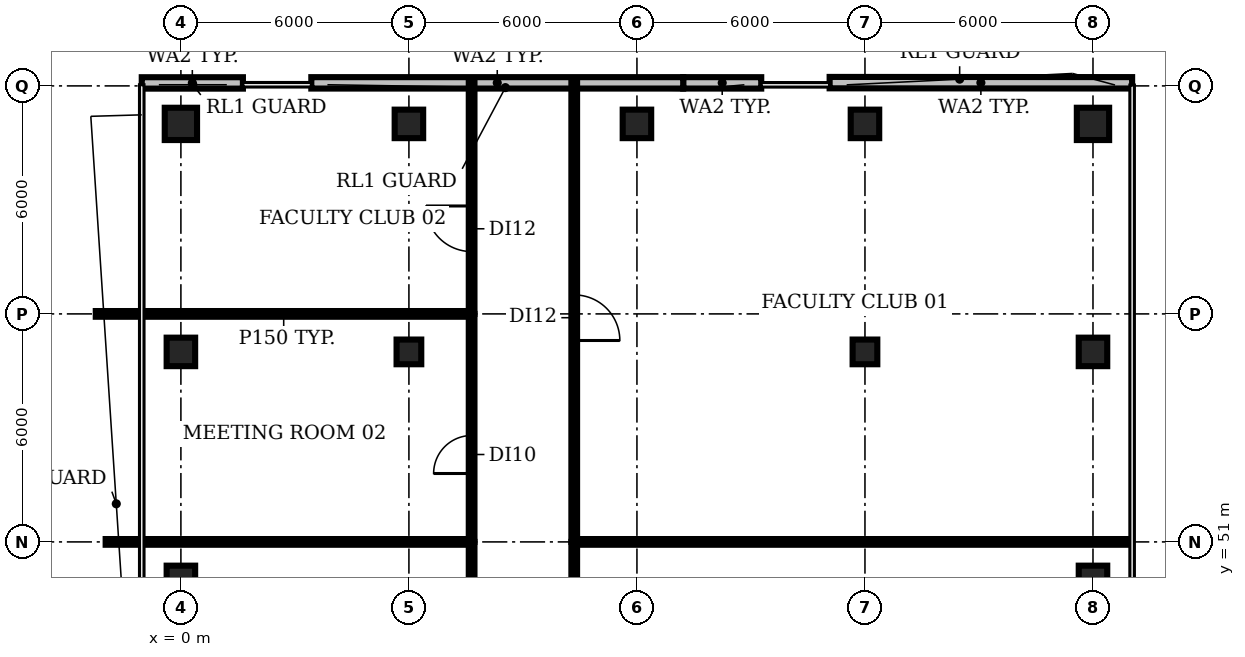
"""IFC4 building model, lengths in metres.
Left out: names, types, materials, properties, quantities, classifications, styles, units other than length and angle.
Written with IfcOpenShell. Run it as: python <this file> out.ifc"""

import sys

from ifc_helpers import new_model, si_unit, direction, frame, frame_2d, origin, origin_2d, place, context, subcontext, project, spatial, rectangle, circle, extrude, element, fill, save


model = new_model("IFC4")
c1 = context("Model", 3, precision=1e-05, world=origin(), true_north=direction((0.0, 1.0)))
c2 = subcontext(c1, "Body", "Model", "MODEL_VIEW")
j1 = project(units=[si_unit("LENGTHUNIT", "METRE"), si_unit("PLANEANGLEUNIT", "RADIAN")], contexts=[c1])
p1 = place(None, origin())
s1 = spatial("IfcSite", under=j1, at=p1, CompositionType="ELEMENT")
p2 = place(p1, origin())
s2 = spatial("IfcBuilding", under=s1, at=p2, CompositionType="ELEMENT")
p3 = place(p2, frame((0.0, 0.0, 297.8)))
s3 = spatial("IfcBuildingStorey", under=s2, at=p3, CompositionType="ELEMENT", Elevation=297.8)
for number, where, z_axis, x_axis in (
    (1, (0.0, 50.0, 0.0), (0.0, 0.0, 1.0), (1.0, 0.0, 0.0)),
    (2, (0.0, 56.0, 0.0), (0.0, 0.0, 1.0), (1.0, 0.0, 0.0)),
):
    element("IfcColumn", number, at=place(p3, frame(where, z_axis=z_axis, x_axis=x_axis)), inside=s3, PredefinedType="COLUMN", context=c2, shape_type="SweptSolid", body=[
        extrude(rectangle(XDim=0.75, YDim=0.75, at=origin_2d()), origin(), (0.0, 0.0, 1.0), 3.85),
    ])
p4 = place(p3, frame((0.0, 62.0, 0.0), z_axis=(0.0, 0.0, 1.0), x_axis=(1.0, 0.0, 0.0)))
e3 = element("IfcColumn", 3, at=p4, inside=s3, PredefinedType="COLUMN", context=c2, shape_type="SweptSolid", body=[
    extrude(circle(Radius=0.425, at=origin_2d()), origin(), (0.0, 0.0, 1.0), 3.85),
])
p5 = place(p3, frame((6.0, 56.0, 0.0), z_axis=(0.0, 0.0, 1.0), x_axis=(1.0, 0.0, 0.0)))
e4 = element("IfcColumn", 4, at=p5, inside=s3, PredefinedType="COLUMN", context=c2, shape_type="SweptSolid", body=[
    extrude(rectangle(XDim=0.65, YDim=0.65, at=origin_2d()), origin(), (0.0, 0.0, 1.0), 3.85),
])
for number, where, z_axis, x_axis in (
    (5, (6.0, 62.0, 0.0), (0.0, 0.0, 1.0), (1.0, 0.0, 0.0)),
    (6, (12.0, 62.0, 0.0), (0.0, 0.0, 1.0), (1.0, 0.0, 0.0)),
):
    element("IfcColumn", number, at=place(p3, frame(where, z_axis=z_axis, x_axis=x_axis)), inside=s3, PredefinedType="COLUMN", context=c2, shape_type="SweptSolid", body=[
        extrude(rectangle(XDim=0.75, YDim=0.75, at=origin_2d()), origin(), (0.0, 0.0, 1.0), 3.85),
    ])
p6 = place(p3, frame((18.0, 56.0, 0.0), z_axis=(0.0, 0.0, 1.0), x_axis=(1.0, 0.0, 0.0)))
e7 = element("IfcColumn", 7, at=p6, inside=s3, PredefinedType="COLUMN", context=c2, shape_type="SweptSolid", body=[
    extrude(rectangle(XDim=0.65, YDim=0.65, at=origin_2d()), origin(), (0.0, 0.0, 1.0), 3.85),
])
for number, where, z_axis, x_axis in (
    (8, (18.0, 62.0, 0.0), (0.0, 0.0, 1.0), (1.0, 0.0, 0.0)),
    (9, (24.0, 50.0, 0.0), (0.0, 0.0, 1.0), (1.0, 0.0, 0.0)),
    (10, (24.0, 56.0, 0.0), (0.0, 0.0, 1.0), (1.0, 0.0, 0.0)),
):
    element("IfcColumn", number, at=place(p3, frame(where, z_axis=z_axis, x_axis=x_axis)), inside=s3, PredefinedType="COLUMN", context=c2, shape_type="SweptSolid", body=[
        extrude(rectangle(XDim=0.75, YDim=0.75, at=origin_2d()), origin(), (0.0, 0.0, 1.0), 3.85),
    ])
p7 = place(p3, frame((24.0, 62.0, 0.0), z_axis=(0.0, 0.0, 1.0), x_axis=(1.0, 0.0, 0.0)))
e11 = element("IfcColumn", 11, at=p7, inside=s3, PredefinedType="COLUMN", context=c2, shape_type="SweptSolid", body=[
    extrude(circle(Radius=0.425, at=origin_2d()), origin(), (0.0, 0.0, 1.0), 3.85),
])
p8 = place(p3, frame((25.03, 63.081, 0.0), z_axis=(0.0, 0.0, 1.0), x_axis=(-0.99999979256, 0.000644112371, 0.0)))
e12 = element("IfcWall", 12, at=p8, inside=s3, PredefinedType="SOLIDWALL", context=c2, shape_type="SweptSolid", body=[
    extrude(rectangle(XDim=7.96, YDim=0.3, at=frame_2d((3.98, 0.0))), origin(), (0.0, 0.0, 1.0), 3.85),
])
p9 = place(p3, frame((15.271, 63.079, 0.0), z_axis=(0.0, 0.0, 1.0), x_axis=(-0.999999823309, 0.000594459531, 0.0)))
e13 = element("IfcWall", 13, at=p9, inside=s3, PredefinedType="SOLIDWALL", context=c2, shape_type="SweptSolid", body=[
    extrude(rectangle(XDim=2.053, YDim=0.3, at=frame_2d((1.027, 0.0))), origin(), (0.0, 0.0, 1.0), 3.85),
])
p10 = place(p3, frame((13.217, 63.08, 0.0), z_axis=(0.0, 0.0, 1.0), x_axis=(-1.0, 0.0, 0.0)))
e14 = element("IfcWall", 14, at=p10, inside=s3, PredefinedType="SOLIDWALL", context=c2, shape_type="SweptSolid", body=[
    extrude(rectangle(XDim=9.785, YDim=0.3, at=frame_2d((4.893, 0.0))), origin(), (0.0, 0.0, 1.0), 3.85),
])
p11 = place(p3, frame((1.632, 63.078, 0.0), z_axis=(0.0, 0.0, 1.0), x_axis=(-1.0, 0.0, 0.0)))
e15 = element("IfcWall", 15, at=p11, inside=s3, PredefinedType="SOLIDWALL", context=c2, shape_type="SweptSolid", body=[
    extrude(rectangle(XDim=2.662, YDim=0.3, at=frame_2d((1.331, 0.0))), origin(), (0.0, 0.0, 1.0), 3.85),
])
p12 = place(p3, frame((-2.24, 57.0, 0.0), z_axis=(0.0, 0.0, 1.0), x_axis=(1.0, 0.0, 0.0)))
e16 = element("IfcWall", 16, at=p12, inside=s3, PredefinedType="PARTITIONING", context=c2, shape_type="SweptSolid", body=[
    extrude(rectangle(XDim=9.89, YDim=0.15, at=frame_2d((4.945, 0.0))), origin(), (0.0, 0.0, 1.0), 2.9),
])
p13 = place(p3, frame((-1.98, 51.0, 0.0), z_axis=(0.0, 0.0, 1.0), x_axis=(1.0, 0.0, 0.0)))
e17 = element("IfcWall", 17, at=p13, inside=s3, PredefinedType="PARTITIONING", context=c2, shape_type="SweptSolid", body=[
    extrude(rectangle(XDim=9.63, YDim=0.15, at=frame_2d((4.815, 0.0))), origin(), (0.0, 0.0, 1.0), 2.9),
])
p14 = place(p3, frame((7.65, 39.0, 0.0), z_axis=(0.0, 0.0, 1.0), x_axis=(0.0, 1.0, 0.0)))
e18 = element("IfcWall", 18, at=p14, inside=s3, PredefinedType="PARTITIONING", context=c2, shape_type="SweptSolid", body=[
    extrude(rectangle(XDim=12.0, YDim=0.15, at=frame_2d((6.0, 0.0))), origin(), (0.0, 0.0, 1.0), 2.9),
])
p15 = place(p14, frame((7.0, 0.0, 0.0)))
e19 = element("IfcOpeningElement", 19, at=p15, cuts=e18, PredefinedType="OPENING", context=c2, shape_type="SweptSolid", body=[
    extrude(rectangle(XDim=1.2, YDim=2.1, at=frame_2d((0.6, 1.05))), frame((0.0, 0.085, 0.0), z_axis=(0.0, -1.0, 0.0), x_axis=(1.0, 0.0, 0.0)), (0.0, 0.0, 1.0), 0.17),
])
p16 = place(p3, frame((7.65, 51.0, 0.0), z_axis=(0.0, 0.0, 1.0), x_axis=(0.0, 1.0, 0.0)))
e20 = element("IfcWall", 20, at=p16, inside=s3, PredefinedType="PARTITIONING", context=c2, shape_type="SweptSolid", body=[
    extrude(rectangle(XDim=6.0, YDim=0.15, at=frame_2d((3.0, 0.0))), origin(), (0.0, 0.0, 1.0), 2.9),
])
p17 = place(p16, frame((1.8, 0.0, 0.0)))
e21 = element("IfcOpeningElement", 21, at=p17, cuts=e20, PredefinedType="OPENING", context=c2, shape_type="SweptSolid", body=[
    extrude(rectangle(XDim=1.0, YDim=2.1, at=frame_2d((0.5, 1.05))), frame((0.0, 0.085, 0.0), z_axis=(0.0, -1.0, 0.0), x_axis=(1.0, 0.0, 0.0)), (0.0, 0.0, 1.0), 0.17),
])
p18 = place(p3, frame((7.65, 57.0, 0.0), z_axis=(0.0, 0.0, 1.0), x_axis=(0.0, 1.0, 0.0)))
e22 = element("IfcWall", 22, at=p18, inside=s3, PredefinedType="PARTITIONING", context=c2, shape_type="SweptSolid", body=[
    extrude(rectangle(XDim=6.09, YDim=0.15, at=frame_2d((3.045, 0.0))), origin(), (0.0, 0.0, 1.0), 2.9),
])
p19 = place(p18, frame((1.64, 0.0, 0.0)))
e23 = element("IfcOpeningElement", 23, at=p19, cuts=e22, PredefinedType="OPENING", context=c2, shape_type="SweptSolid", body=[
    extrude(rectangle(XDim=1.2, YDim=2.1, at=frame_2d((0.6, 1.05))), frame((0.0, 0.085, 0.0), z_axis=(0.0, -1.0, 0.0), x_axis=(1.0, 0.0, 0.0)), (0.0, 0.0, 1.0), 0.17),
])
p20 = place(p3, frame((10.35, 51.0, 0.0), z_axis=(0.0, 0.0, 1.0), x_axis=(0.0, -1.0, 0.0)))
e24 = element("IfcWall", 24, at=p20, inside=s3, PredefinedType="PARTITIONING", context=c2, shape_type="SweptSolid", body=[
    extrude(rectangle(XDim=6.0, YDim=0.15, at=frame_2d((3.0, 0.0))), origin(), (0.0, 0.0, 1.0), 2.9),
])
p21 = place(p20, frame((2.4, 0.0, 0.0)))
e25 = element("IfcOpeningElement", 25, at=p21, cuts=e24, PredefinedType="OPENING", context=c2, shape_type="SweptSolid", body=[
    extrude(rectangle(XDim=1.0, YDim=2.1, at=frame_2d((0.5, 1.05))), frame((0.0, 0.085, 0.0), z_axis=(0.0, -1.0, 0.0), x_axis=(1.0, 0.0, 0.0)), (0.0, 0.0, 1.0), 0.17),
])
p22 = place(p3, frame((10.35, 51.0, 0.0), z_axis=(0.0, 0.0, 1.0), x_axis=(1.0, 0.0, 0.0)))
e26 = element("IfcWall", 26, at=p22, inside=s3, PredefinedType="PARTITIONING", context=c2, shape_type="SweptSolid", body=[
    extrude(rectangle(XDim=14.63, YDim=0.15, at=frame_2d((7.315, 0.0))), origin(), (0.0, 0.0, 1.0), 2.9),
])
p23 = place(p3, frame((10.35, 63.09, 0.0), z_axis=(0.0, 0.0, 1.0), x_axis=(0.0, -1.0, 0.0)))
e27 = element("IfcWall", 27, at=p23, inside=s3, PredefinedType="PARTITIONING", context=c2, shape_type="SweptSolid", body=[
    extrude(rectangle(XDim=12.09, YDim=0.15, at=frame_2d((6.045, 0.0))), origin(), (0.0, 0.0, 1.0), 2.9),
])
p24 = place(p23, frame((5.59, 0.0, 0.0)))
e28 = element("IfcOpeningElement", 28, at=p24, cuts=e27, PredefinedType="OPENING", context=c2, shape_type="SweptSolid", body=[
    extrude(rectangle(XDim=1.2, YDim=2.1, at=frame_2d((0.6, 1.05))), frame((0.0, 0.085, 0.0), z_axis=(0.0, -1.0, 0.0), x_axis=(1.0, 0.0, 0.0)), (0.0, 0.0, 1.0), 0.17),
])
p25 = place(p17, origin())
e29 = element("IfcDoor", 29, at=p25, inside=s3, OperationType="SINGLE_SWING_LEFT", PredefinedType="DOOR", context=c2, shape_type="SweptSolid", body=[
    extrude(rectangle(XDim=1.0, YDim=2.1, at=frame_2d((0.5, 1.05))), frame((0.0, 0.025, 0.0), z_axis=(0.0, -1.0, 0.0), x_axis=(1.0, 0.0, 0.0)), (0.0, 0.0, 1.0), 0.05),
])
fill(e21, e29)
p26 = place(p19, origin())
e30 = element("IfcDoor", 30, at=p26, inside=s3, OperationType="SINGLE_SWING_RIGHT", PredefinedType="DOOR", context=c2, shape_type="SweptSolid", body=[
    extrude(rectangle(XDim=1.2, YDim=2.1, at=frame_2d((0.6, 1.05))), frame((0.0, 0.025, 0.0), z_axis=(0.0, -1.0, 0.0), x_axis=(1.0, 0.0, 0.0)), (0.0, 0.0, 1.0), 0.05),
])
fill(e23, e30)
p27 = place(p24, origin())
e31 = element("IfcDoor", 31, at=p27, inside=s3, OperationType="SINGLE_SWING_RIGHT", PredefinedType="DOOR", context=c2, shape_type="SweptSolid", body=[
    extrude(rectangle(XDim=1.2, YDim=2.1, at=frame_2d((0.6, 1.05))), frame((0.0, 0.025, 0.0), z_axis=(0.0, -1.0, 0.0), x_axis=(1.0, 0.0, 0.0)), (0.0, 0.0, 1.0), 0.05),
])
fill(e28, e31)
save(model, sys.argv[1])
